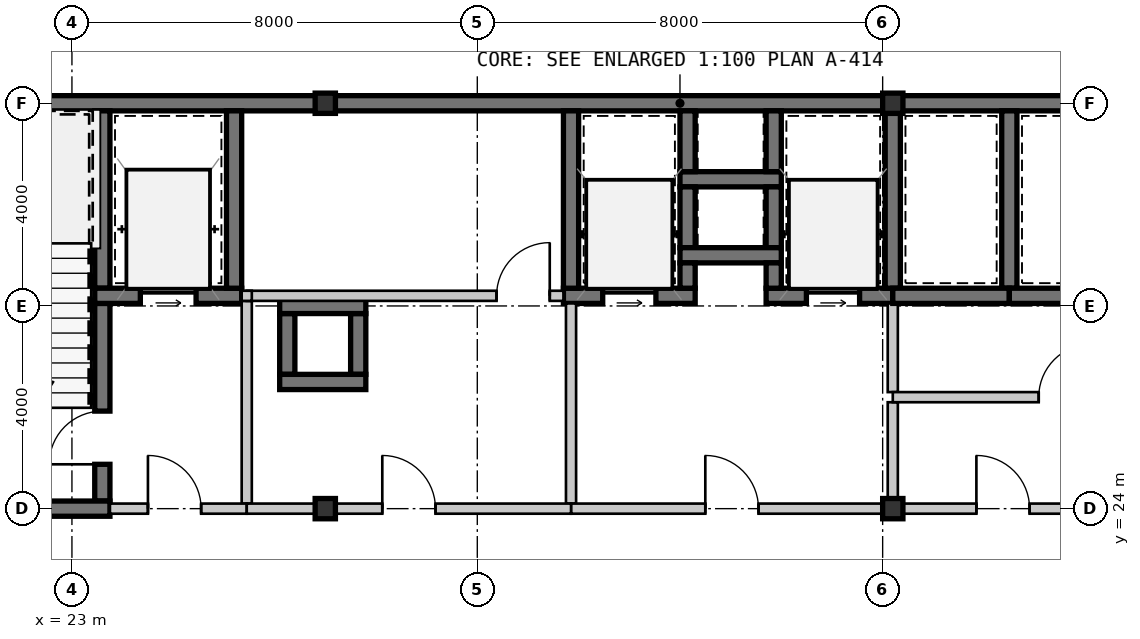
"""IFC4 building model, lengths in metres.
Left out: names, types, materials, properties, quantities, classifications, styles, units other than length and angle.
Written with IfcOpenShell. Run it as: python <this file> out.ifc"""

import sys

from ifc_helpers import new_model, si_unit, direction, frame, frame_2d, origin, origin_2d, place, context, subcontext, project, spatial, rectangle, hollow_rectangle, extrude, source, transform, mapped, element, fill, save


model = new_model("IFC4")
c1 = context("Model", 3, precision=1e-05, world=origin(), true_north=direction((0.0, 1.0)))
c2 = subcontext(c1, "Body", "Model", "MODEL_VIEW")
j1 = project(units=[si_unit("LENGTHUNIT", "METRE"), si_unit("PLANEANGLEUNIT", "RADIAN")], contexts=[c1])
p1 = place(None, origin())
s1 = spatial("IfcSite", under=j1, at=p1, CompositionType="ELEMENT")
p2 = place(p1, origin())
s2 = spatial("IfcBuilding", under=s1, at=p2, CompositionType="ELEMENT")
p3 = place(p2, frame((0.0, 0.0, 126.7)))
s3 = spatial("IfcBuildingStorey", under=s2, at=p3, CompositionType="ELEMENT", Elevation=126.7)
m1 = source(origin(), c2, "Body", "SweptSolid", [
    extrude(hollow_rectangle(XDim=0.4, YDim=0.4, WallThickness=0.016, at=origin_2d()), origin(), (0.0, 0.0, 1.0), 3.15),
])
for number, where, z_axis, x_axis in (
    (1, (28.0, 24.0, 0.0), (0.0, 0.0, 1.0), (1.0, 0.0, 0.0)),
    (2, (39.2, 24.0, 0.0), (0.0, 0.0, 1.0), (1.0, 0.0, 0.0)),
    (3, (28.0, 32.0, 0.0), (0.0, 0.0, 1.0), (1.0, 0.0, 0.0)),
    (4, (39.2, 32.0, 0.0), (0.0, 0.0, 1.0), (1.0, 0.0, 0.0)),
):
    element("IfcColumn", number, at=place(p3, frame(where, z_axis=z_axis, x_axis=x_axis)), inside=s3, PredefinedType="COLUMN", context=c2, shape_type="MappedRepresentation", body=[
        mapped(m1, transform((0.0, 0.0, 0.0), scale=1.0)),
    ])
m2 = source(origin(), c2, "Body", "SweptSolid", [
    extrude(rectangle(XDim=9.15, YDim=0.3, at=frame_2d((4.575, 0.0))), origin(), (0.0, 0.0, 1.0), 2.93),
])
p4 = place(p3, frame((18.85, 32.0, 0.0), z_axis=(0.0, 0.0, 1.0), x_axis=(1.0, 0.0, 0.0)))
e5 = element("IfcWall", 5, at=p4, inside=s3, PredefinedType="SHEAR", context=c2, shape_type="MappedRepresentation", body=[
    mapped(m2, transform((0.0, 0.0, 0.0), scale=1.0)),
])
m3 = source(origin(), c2, "Body", "SweptSolid", [
    extrude(rectangle(XDim=11.2, YDim=0.3, at=frame_2d((5.6, 0.0))), origin(), (0.0, 0.0, 1.0), 2.93),
])
p5 = place(p3, frame((28.0, 32.0, 0.0), z_axis=(0.0, 0.0, 1.0), x_axis=(1.0, 0.0, 0.0)))
e6 = element("IfcWall", 6, at=p5, inside=s3, PredefinedType="SHEAR", context=c2, shape_type="MappedRepresentation", body=[
    mapped(m3, transform((0.0, 0.0, 0.0), scale=1.0)),
])
m4 = source(origin(), c2, "Body", "SweptSolid", [
    extrude(rectangle(XDim=11.95, YDim=0.3, at=frame_2d((5.975, 0.0))), origin(), (0.0, 0.0, 1.0), 2.93),
])
p6 = place(p3, frame((39.2, 32.0, 0.0), z_axis=(0.0, 0.0, 1.0), x_axis=(1.0, 0.0, 0.0)))
e7 = element("IfcWall", 7, at=p6, inside=s3, PredefinedType="SHEAR", context=c2, shape_type="MappedRepresentation", body=[
    mapped(m4, transform((0.0, 0.0, 0.0), scale=1.0)),
])
m5 = source(origin(), c2, "Body", "SweptSolid", [
    extrude(rectangle(XDim=3.5, YDim=0.3, at=frame_2d((1.75, 0.0))), origin(), (0.0, 0.0, 1.0), 2.93),
])
p7 = place(p3, frame((23.6, 28.35, 0.0), z_axis=(0.0, 0.0, 1.0), x_axis=(0.0, 1.0, 0.0)))
e8 = element("IfcWall", 8, at=p7, inside=s3, PredefinedType="SHEAR", context=c2, shape_type="MappedRepresentation", body=[
    mapped(m5, transform((0.0, 0.0, 0.0), scale=1.0)),
])
m6 = source(origin(), c2, "Body", "SweptSolid", [
    extrude(rectangle(XDim=3.9, YDim=0.3, at=frame_2d((1.95, 0.0))), origin(), (0.0, 0.0, 1.0), 2.93),
])
p8 = place(p3, frame((23.6, 24.15, 0.0), z_axis=(0.0, 0.0, 1.0), x_axis=(0.0, 1.0, 0.0)))
e9 = element("IfcWall", 9, at=p8, inside=s3, PredefinedType="SHEAR", context=c2, shape_type="MappedRepresentation", body=[
    mapped(m6, transform((0.0, 0.0, 0.0), scale=1.0)),
])
m7 = source(origin(), c2, "Body", "SweptSolid", [
    extrude(rectangle(XDim=1.05, YDim=2.1, at=frame_2d((0.525, 1.05))), frame((0.0, 0.16, 0.0), z_axis=(0.0, -1.0, 0.0), x_axis=(1.0, 0.0, 0.0)), (0.0, 0.0, 1.0), 0.32),
])
p9 = place(p8, frame((0.725, 0.0, 0.0)))
e10 = element("IfcOpeningElement", 10, at=p9, cuts=e9, PredefinedType="OPENING", context=c2, shape_type="MappedRepresentation", body=[
    mapped(m7, transform((0.0, 0.0, 0.0), scale=1.0)),
])
m8 = source(origin(), c2, "Body", "SweptSolid", [
    extrude(rectangle(XDim=4.9, YDim=0.3, at=frame_2d((2.45, 0.0))), origin(), (0.0, 0.0, 1.0), 2.93),
])
p10 = place(p3, frame((18.85, 24.0, 0.0), z_axis=(0.0, 0.0, 1.0), x_axis=(1.0, 0.0, 0.0)))
e11 = element("IfcWall", 11, at=p10, inside=s3, PredefinedType="SHEAR", context=c2, shape_type="MappedRepresentation", body=[
    mapped(m8, transform((0.0, 0.0, 0.0), scale=1.0)),
])
m9 = source(origin(), c2, "Body", "SweptSolid", [
    extrude(rectangle(XDim=2.9, YDim=0.3, at=frame_2d((1.45, 0.0))), origin(), (0.0, 0.0, 1.0), 2.93),
])
p11 = place(p3, frame((23.45, 28.2, 0.0), z_axis=(0.0, 0.0, 1.0), x_axis=(1.0, 0.0, 0.0)))
e12 = element("IfcWall", 12, at=p11, inside=s3, PredefinedType="SHEAR", context=c2, shape_type="MappedRepresentation", body=[
    mapped(m9, transform((0.0, 0.0, 0.0), scale=1.0)),
])
m10 = source(origin(), c2, "Body", "SweptSolid", [
    extrude(rectangle(XDim=1.1, YDim=2.15, at=frame_2d((0.55, 1.075))), frame((0.0, 0.16, 0.0), z_axis=(0.0, -1.0, 0.0), x_axis=(1.0, 0.0, 0.0)), (0.0, 0.0, 1.0), 0.32),
])
p12 = place(p11, frame((0.9, 0.0, 0.0)))
e13 = element("IfcOpeningElement", 13, at=p12, cuts=e12, PredefinedType="OPENING", context=c2, shape_type="MappedRepresentation", body=[
    mapped(m10, transform((0.0, 0.0, 0.0), scale=1.0)),
])
p13 = place(p3, frame((26.2, 28.35, 0.0), z_axis=(0.0, 0.0, 1.0), x_axis=(0.0, 1.0, 0.0)))
e14 = element("IfcWall", 14, at=p13, inside=s3, PredefinedType="SHEAR", context=c2, shape_type="MappedRepresentation", body=[
    mapped(m5, transform((0.0, 0.0, 0.0), scale=1.0)),
])
m11 = source(origin(), c2, "Body", "SweptSolid", [
    extrude(rectangle(XDim=4.0, YDim=0.2, at=frame_2d((2.0, 0.0))), origin(), (0.0, 0.0, 1.0), 2.93),
])
p14 = place(p3, frame((26.45, 24.1, 0.0), z_axis=(0.0, 0.0, 1.0), x_axis=(0.0, 1.0, 0.0)))
e15 = element("IfcWall", 15, at=p14, inside=s3, PredefinedType="SOLIDWALL", context=c2, shape_type="MappedRepresentation", body=[
    mapped(m11, transform((0.0, 0.0, 0.0), scale=1.0)),
])
m12 = source(origin(), c2, "Body", "SweptSolid", [
    extrude(rectangle(XDim=2.7, YDim=0.2, at=frame_2d((1.35, 0.0))), origin(), (0.0, 0.0, 1.0), 2.47),
])
p15 = place(p3, frame((23.75, 24.0, 0.0), z_axis=(0.0, 0.0, 1.0), x_axis=(1.0, 0.0, 0.0)))
e16 = element("IfcWall", 16, at=p15, inside=s3, PredefinedType="SOLIDWALL", context=c2, shape_type="MappedRepresentation", body=[
    mapped(m12, transform((0.0, 0.0, 0.0), scale=1.0)),
])
m13 = source(origin(), c2, "Body", "SweptSolid", [
    extrude(rectangle(XDim=1.05, YDim=2.1, at=frame_2d((0.525, 1.05))), frame((0.0, 0.11, 0.0), z_axis=(0.0, -1.0, 0.0), x_axis=(1.0, 0.0, 0.0)), (0.0, 0.0, 1.0), 0.22),
])
p16 = place(p15, frame((0.75, 0.0, 0.0)))
e17 = element("IfcOpeningElement", 17, at=p16, cuts=e16, PredefinedType="OPENING", context=c2, shape_type="MappedRepresentation", body=[
    mapped(m13, transform((0.0, 0.0, 0.0), scale=1.0)),
])
m14 = source(origin(), c2, "Body", "SweptSolid", [
    extrude(rectangle(XDim=2.0, YDim=0.3, at=frame_2d((1.0, 0.0))), origin(), (0.0, 0.0, 1.0), 2.93),
])
p17 = place(p3, frame((35.0, 30.5, 0.0), z_axis=(0.0, 0.0, 1.0), x_axis=(1.0, 0.0, 0.0)))
e18 = element("IfcWall", 18, at=p17, inside=s3, PredefinedType="SHEAR", context=c2, shape_type="MappedRepresentation", body=[
    mapped(m14, transform((0.0, 0.0, 0.0), scale=1.0)),
])
m15 = source(origin(), c2, "Body", "SweptSolid", [
    extrude(rectangle(XDim=1.2, YDim=0.3, at=frame_2d((0.6, 0.0))), origin(), (0.0, 0.0, 1.0), 2.93),
])
for number, where, z_axis, x_axis in (
    (19, (35.15, 31.85, 0.0), (0.0, 0.0, 1.0), (0.0, -1.0, 0.0)),
    (20, (36.85, 30.65, 0.0), (0.0, 0.0, 1.0), (0.0, 1.0, 0.0)),
    (21, (35.15, 30.35, 0.0), (0.0, 0.0, 1.0), (0.0, -1.0, 0.0)),
    (22, (36.85, 29.15, 0.0), (0.0, 0.0, 1.0), (0.0, 1.0, 0.0)),
):
    element("IfcWall", number, at=place(p3, frame(where, z_axis=z_axis, x_axis=x_axis)), inside=s3, PredefinedType="SHEAR", context=c2, shape_type="MappedRepresentation", body=[
        mapped(m15, transform((0.0, 0.0, 0.0), scale=1.0)),
    ])
p18 = place(p3, frame((35.0, 29.0, 0.0), z_axis=(0.0, 0.0, 1.0), x_axis=(1.0, 0.0, 0.0)))
e23 = element("IfcWall", 23, at=p18, inside=s3, PredefinedType="SHEAR", context=c2, shape_type="MappedRepresentation", body=[
    mapped(m14, transform((0.0, 0.0, 0.0), scale=1.0)),
])
for number, where, z_axis, x_axis in (
    (24, (28.65, 26.65, 0.0), (0.0, 0.0, 1.0), (0.0, 1.0, 0.0)),
    (25, (27.25, 27.85, 0.0), (0.0, 0.0, 1.0), (0.0, -1.0, 0.0)),
):
    element("IfcWall", number, at=place(p3, frame(where, z_axis=z_axis, x_axis=x_axis)), inside=s3, PredefinedType="SHEAR", context=c2, shape_type="MappedRepresentation", body=[
        mapped(m15, transform((0.0, 0.0, 0.0), scale=1.0)),
    ])
m16 = source(origin(), c2, "Body", "SweptSolid", [
    extrude(rectangle(XDim=1.7, YDim=0.3, at=frame_2d((0.85, 0.0))), origin(), (0.0, 0.0, 1.0), 2.93),
])
for number, where, z_axis, x_axis in (
    (26, (28.8, 28.0, 0.0), (0.0, 0.0, 1.0), (-1.0, 0.0, 0.0)),
    (27, (27.1, 26.5, 0.0), (0.0, 0.0, 1.0), (1.0, 0.0, 0.0)),
):
    element("IfcWall", number, at=place(p3, frame(where, z_axis=z_axis, x_axis=x_axis)), inside=s3, PredefinedType="SHEAR", context=c2, shape_type="MappedRepresentation", body=[
        mapped(m16, transform((0.0, 0.0, 0.0), scale=1.0)),
    ])
m17 = source(origin(), c2, "Body", "SweptSolid", [
    extrude(rectangle(XDim=2.6, YDim=0.3, at=frame_2d((1.3, 0.0))), origin(), (0.0, 0.0, 1.0), 2.93),
])
p19 = place(p3, frame((32.7, 28.2, 0.0), z_axis=(0.0, 0.0, 1.0), x_axis=(1.0, 0.0, 0.0)))
e28 = element("IfcWall", 28, at=p19, inside=s3, PredefinedType="SHEAR", context=c2, shape_type="MappedRepresentation", body=[
    mapped(m17, transform((0.0, 0.0, 0.0), scale=1.0)),
])
m18 = source(origin(), c2, "Body", "SweptSolid", [
    extrude(rectangle(XDim=1.05, YDim=2.15, at=frame_2d((0.525, 1.075))), frame((0.0, 0.16, 0.0), z_axis=(0.0, -1.0, 0.0), x_axis=(1.0, 0.0, 0.0)), (0.0, 0.0, 1.0), 0.32),
])
p20 = place(p19, frame((0.775, 0.0, 0.0)))
e29 = element("IfcOpeningElement", 29, at=p20, cuts=e28, PredefinedType="OPENING", context=c2, shape_type="MappedRepresentation", body=[
    mapped(m18, transform((0.0, 0.0, 0.0), scale=1.0)),
])
m19 = source(origin(), c2, "Body", "SweptSolid", [
    extrude(rectangle(XDim=0.5, YDim=0.3, at=frame_2d((0.25, 0.0))), origin(), (0.0, 0.0, 1.0), 2.93),
])
p21 = place(p3, frame((35.15, 28.35, 0.0), z_axis=(0.0, 0.0, 1.0), x_axis=(0.0, 1.0, 0.0)))
e30 = element("IfcWall", 30, at=p21, inside=s3, PredefinedType="SHEAR", context=c2, shape_type="MappedRepresentation", body=[
    mapped(m19, transform((0.0, 0.0, 0.0), scale=1.0)),
])
p22 = place(p3, frame((32.85, 31.85, 0.0), z_axis=(0.0, 0.0, 1.0), x_axis=(0.0, -1.0, 0.0)))
e31 = element("IfcWall", 31, at=p22, inside=s3, PredefinedType="SHEAR", context=c2, shape_type="MappedRepresentation", body=[
    mapped(m5, transform((0.0, 0.0, 0.0), scale=1.0)),
])
m20 = source(origin(), c2, "Body", "SweptSolid", [
    extrude(rectangle(XDim=2.5, YDim=0.3, at=frame_2d((1.25, 0.0))), origin(), (0.0, 0.0, 1.0), 2.93),
])
p23 = place(p3, frame((36.7, 28.2, 0.0), z_axis=(0.0, 0.0, 1.0), x_axis=(1.0, 0.0, 0.0)))
e32 = element("IfcWall", 32, at=p23, inside=s3, PredefinedType="SHEAR", context=c2, shape_type="MappedRepresentation", body=[
    mapped(m20, transform((0.0, 0.0, 0.0), scale=1.0)),
])
p24 = place(p23, frame((0.795, 0.0, 0.0)))
e33 = element("IfcOpeningElement", 33, at=p24, cuts=e32, PredefinedType="OPENING", context=c2, shape_type="MappedRepresentation", body=[
    mapped(m18, transform((0.0, 0.0, 0.0), scale=1.0)),
])
p25 = place(p3, frame((36.85, 28.85, 0.0), z_axis=(0.0, 0.0, 1.0), x_axis=(0.0, -1.0, 0.0)))
e34 = element("IfcWall", 34, at=p25, inside=s3, PredefinedType="SHEAR", context=c2, shape_type="MappedRepresentation", body=[
    mapped(m19, transform((0.0, 0.0, 0.0), scale=1.0)),
])
p26 = place(p3, frame((39.2, 28.35, 0.0), z_axis=(0.0, 0.0, 1.0), x_axis=(0.0, 1.0, 0.0)))
e35 = element("IfcWall", 35, at=p26, inside=s3, PredefinedType="SHEAR", context=c2, shape_type="MappedRepresentation", body=[
    mapped(m5, transform((0.0, 0.0, 0.0), scale=1.0)),
])
m21 = source(origin(), c2, "Body", "SweptSolid", [
    extrude(rectangle(XDim=3.95, YDim=0.2, at=frame_2d((1.975, 0.0))), origin(), (0.0, 0.0, 1.0), 2.93),
])
p27 = place(p3, frame((32.85, 24.1, 0.0), z_axis=(0.0, 0.0, 1.0), x_axis=(0.0, 1.0, 0.0)))
e36 = element("IfcWall", 36, at=p27, inside=s3, PredefinedType="SOLIDWALL", context=c2, shape_type="MappedRepresentation", body=[
    mapped(m21, transform((0.0, 0.0, 0.0), scale=1.0)),
])
m22 = source(origin(), c2, "Body", "SweptSolid", [
    extrude(rectangle(XDim=2.0, YDim=0.2, at=frame_2d((1.0, 0.0))), origin(), (0.0, 0.0, 1.0), 2.47),
])
p28 = place(p3, frame((39.2, 26.1, 0.0), z_axis=(0.0, 0.0, 1.0), x_axis=(0.0, -1.0, 0.0)))
e37 = element("IfcWall", 37, at=p28, inside=s3, PredefinedType="SOLIDWALL", context=c2, shape_type="MappedRepresentation", body=[
    mapped(m22, transform((0.0, 0.0, 0.0), scale=1.0)),
])
m23 = source(origin(), c2, "Body", "SweptSolid", [
    extrude(rectangle(XDim=1.75, YDim=0.2, at=frame_2d((0.875, 0.0))), origin(), (0.0, 0.0, 1.0), 2.47),
])
p29 = place(p3, frame((39.2, 28.05, 0.0), z_axis=(0.0, 0.0, 1.0), x_axis=(0.0, -1.0, 0.0)))
e38 = element("IfcWall", 38, at=p29, inside=s3, PredefinedType="SOLIDWALL", context=c2, shape_type="MappedRepresentation", body=[
    mapped(m23, transform((0.0, 0.0, 0.0), scale=1.0)),
])
m24 = source(origin(), c2, "Body", "SweptSolid", [
    extrude(rectangle(XDim=6.35, YDim=0.2, at=frame_2d((3.175, 0.0))), origin(), (0.0, 0.0, 1.0), 2.47),
])
p30 = place(p3, frame((39.2, 24.0, 0.0), z_axis=(0.0, 0.0, 1.0), x_axis=(-1.0, 0.0, 0.0)))
e39 = element("IfcWall", 39, at=p30, inside=s3, PredefinedType="SOLIDWALL", context=c2, shape_type="MappedRepresentation", body=[
    mapped(m24, transform((0.0, 0.0, 0.0), scale=1.0)),
])
p31 = place(p30, frame((2.65, 0.0, 0.0)))
e40 = element("IfcOpeningElement", 40, at=p31, cuts=e39, PredefinedType="OPENING", context=c2, shape_type="MappedRepresentation", body=[
    mapped(m13, transform((0.0, 0.0, 0.0), scale=1.0)),
])
p32 = place(p3, frame((41.5, 28.35, 0.0), z_axis=(0.0, 0.0, 1.0), x_axis=(0.0, 1.0, 0.0)))
e41 = element("IfcWall", 41, at=p32, inside=s3, PredefinedType="SHEAR", context=c2, shape_type="MappedRepresentation", body=[
    mapped(m5, transform((0.0, 0.0, 0.0), scale=1.0)),
])
m25 = source(origin(), c2, "Body", "SweptSolid", [
    extrude(rectangle(XDim=2.3, YDim=0.3, at=frame_2d((1.15, 0.0))), origin(), (0.0, 0.0, 1.0), 2.93),
])
p33 = place(p3, frame((39.2, 28.2, 0.0), z_axis=(0.0, 0.0, 1.0), x_axis=(1.0, 0.0, 0.0)))
e42 = element("IfcWall", 42, at=p33, inside=s3, PredefinedType="SHEAR", context=c2, shape_type="MappedRepresentation", body=[
    mapped(m25, transform((0.0, 0.0, 0.0), scale=1.0)),
])
m26 = source(origin(), c2, "Body", "SweptSolid", [
    extrude(rectangle(XDim=2.07, YDim=0.3, at=frame_2d((1.035, 0.0))), origin(), (0.0, 0.0, 1.0), 2.93),
])
p34 = place(p3, frame((41.5, 28.2, 0.0), z_axis=(0.0, 0.0, 1.0), x_axis=(1.0, 0.0, 0.0)))
e43 = element("IfcWall", 43, at=p34, inside=s3, PredefinedType="SHEAR", context=c2, shape_type="MappedRepresentation", body=[
    mapped(m26, transform((0.0, 0.0, 0.0), scale=1.0)),
])
m27 = source(origin(), c2, "Body", "SweptSolid", [
    extrude(rectangle(XDim=6.25, YDim=0.2, at=frame_2d((3.125, 0.0))), origin(), (0.0, 0.0, 1.0), 2.93),
])
p35 = place(p3, frame((26.45, 28.2, 0.0), z_axis=(0.0, 0.0, 1.0), x_axis=(1.0, 0.0, 0.0)))
e44 = element("IfcWall", 44, at=p35, inside=s3, PredefinedType="SOLIDWALL", context=c2, shape_type="MappedRepresentation", body=[
    mapped(m27, transform((0.0, 0.0, 0.0), scale=1.0)),
])
p36 = place(p35, frame((4.93, 0.0, 0.0)))
e45 = element("IfcOpeningElement", 45, at=p36, cuts=e44, PredefinedType="OPENING", context=c2, shape_type="MappedRepresentation", body=[
    mapped(m13, transform((0.0, 0.0, 0.0), scale=1.0)),
])
m28 = source(origin(), c2, "Body", "SweptSolid", [
    extrude(rectangle(XDim=6.4, YDim=0.2, at=frame_2d((3.2, 0.0))), origin(), (0.0, 0.0, 1.0), 2.47),
])
p37 = place(p3, frame((32.85, 24.0, 0.0), z_axis=(0.0, 0.0, 1.0), x_axis=(-1.0, 0.0, 0.0)))
e46 = element("IfcWall", 46, at=p37, inside=s3, PredefinedType="SOLIDWALL", context=c2, shape_type="MappedRepresentation", body=[
    mapped(m28, transform((0.0, 0.0, 0.0), scale=1.0)),
])
p38 = place(p37, frame((2.675, 0.0, 0.0)))
e47 = element("IfcOpeningElement", 47, at=p38, cuts=e46, PredefinedType="OPENING", context=c2, shape_type="MappedRepresentation", body=[
    mapped(m13, transform((0.0, 0.0, 0.0), scale=1.0)),
])
m29 = source(origin(), c2, "Body", "SweptSolid", [
    extrude(rectangle(XDim=4.35, YDim=0.2, at=frame_2d((2.175, 0.0))), origin(), (0.0, 0.0, 1.0), 2.93),
])
p39 = place(p3, frame((39.2, 26.2, 0.0), z_axis=(0.0, 0.0, 1.0), x_axis=(1.0, 0.0, 0.0)))
e48 = element("IfcWall", 48, at=p39, inside=s3, PredefinedType="SOLIDWALL", context=c2, shape_type="MappedRepresentation", body=[
    mapped(m29, transform((0.0, 0.0, 0.0), scale=1.0)),
])
p40 = place(p39, frame((2.88, 0.0, 0.0)))
e49 = element("IfcOpeningElement", 49, at=p40, cuts=e48, PredefinedType="OPENING", context=c2, shape_type="MappedRepresentation", body=[
    mapped(m13, transform((0.0, 0.0, 0.0), scale=1.0)),
])
m30 = source(origin(), c2, "Body", "SweptSolid", [
    extrude(rectangle(XDim=4.35, YDim=0.2, at=frame_2d((2.175, 0.0))), origin(), (0.0, 0.0, 1.0), 2.397),
])
p41 = place(p3, frame((43.55, 24.0, 0.0), z_axis=(0.0, 0.0, 1.0), x_axis=(-1.0, 0.0, 0.0)))
e50 = element("IfcWall", 50, at=p41, inside=s3, PredefinedType="SOLIDWALL", context=c2, shape_type="MappedRepresentation", body=[
    mapped(m30, transform((0.0, 0.0, 0.0), scale=1.0)),
])
p42 = place(p41, frame((1.65, 0.0, 0.0)))
e51 = element("IfcOpeningElement", 51, at=p42, cuts=e50, PredefinedType="OPENING", context=c2, shape_type="MappedRepresentation", body=[
    mapped(m13, transform((0.0, 0.0, 0.0), scale=1.0)),
])
m31 = source(origin(), c2, "Body", "SweptSolid", [
    extrude(rectangle(XDim=0.2, YDim=0.2, at=frame_2d((0.1, 0.0))), origin(), (0.0, 0.0, 1.0), 2.93),
])
p43 = place(p3, frame((26.35, 28.2, 0.0), z_axis=(0.0, 0.0, 1.0), x_axis=(1.0, 0.0, 0.0)))
e52 = element("IfcWall", 52, at=p43, inside=s3, PredefinedType="SOLIDWALL", context=c2, shape_type="MappedRepresentation", body=[
    mapped(m31, transform((0.0, 0.0, 0.0), scale=1.0)),
])
m32 = source(origin(), c2, "Body", "SweptSolid", [
    extrude(rectangle(XDim=1.05, YDim=2.1, at=frame_2d((0.525, 1.05))), frame((0.0, 0.025, 0.0), z_axis=(0.0, -1.0, 0.0), x_axis=(1.0, 0.0, 0.0)), (0.0, 0.0, 1.0), 0.05),
])
p44 = place(p9, origin())
e53 = element("IfcDoor", 53, at=p44, inside=s3, OperationType="SINGLE_SWING_LEFT", PredefinedType="DOOR", context=c2, shape_type="MappedRepresentation", body=[
    mapped(m32, transform((0.0, 0.0, 0.0), scale=1.0)),
])
fill(e10, e53)
m33 = source(origin(), c2, "Body", "SweptSolid", [
    extrude(rectangle(XDim=1.1, YDim=2.15, at=frame_2d((0.55, 1.075))), frame((0.0, 0.025, 0.0), z_axis=(0.0, -1.0, 0.0), x_axis=(1.0, 0.0, 0.0)), (0.0, 0.0, 1.0), 0.05),
])
p45 = place(p12, origin())
e54 = element("IfcDoor", 54, at=p45, inside=s3, OperationType="SLIDING_TO_LEFT", PredefinedType="DOOR", context=c2, shape_type="MappedRepresentation", body=[
    mapped(m33, transform((0.0, 0.0, 0.0), scale=1.0)),
])
fill(e13, e54)
p46 = place(p16, origin())
e55 = element("IfcDoor", 55, at=p46, inside=s3, OperationType="SINGLE_SWING_LEFT", PredefinedType="DOOR", context=c2, shape_type="MappedRepresentation", body=[
    mapped(m32, transform((0.0, 0.0, 0.0), scale=1.0)),
])
fill(e17, e55)
m34 = source(origin(), c2, "Body", "SweptSolid", [
    extrude(rectangle(XDim=1.05, YDim=2.15, at=frame_2d((0.525, 1.075))), frame((0.0, 0.025, 0.0), z_axis=(0.0, -1.0, 0.0), x_axis=(1.0, 0.0, 0.0)), (0.0, 0.0, 1.0), 0.05),
])
p47 = place(p20, origin())
e56 = element("IfcDoor", 56, at=p47, inside=s3, OperationType="SLIDING_TO_LEFT", PredefinedType="DOOR", context=c2, shape_type="MappedRepresentation", body=[
    mapped(m34, transform((0.0, 0.0, 0.0), scale=1.0)),
])
fill(e29, e56)
p48 = place(p24, origin())
e57 = element("IfcDoor", 57, at=p48, inside=s3, OperationType="SLIDING_TO_LEFT", PredefinedType="DOOR", context=c2, shape_type="MappedRepresentation", body=[
    mapped(m34, transform((0.0, 0.0, 0.0), scale=1.0)),
])
fill(e33, e57)
p49 = place(p31, frame((1.05, 0.0, 0.0), z_axis=(0.0, 0.0, 1.0), x_axis=(-1.0, 0.0, 0.0)))
e58 = element("IfcDoor", 58, at=p49, inside=s3, OperationType="SINGLE_SWING_LEFT", PredefinedType="DOOR", context=c2, shape_type="MappedRepresentation", body=[
    mapped(m32, transform((0.0, 0.0, 0.0), scale=1.0)),
])
fill(e40, e58)
p50 = place(p36, origin())
e59 = element("IfcDoor", 59, at=p50, inside=s3, OperationType="SINGLE_SWING_RIGHT", PredefinedType="DOOR", context=c2, shape_type="MappedRepresentation", body=[
    mapped(m32, transform((0.0, 0.0, 0.0), scale=1.0)),
])
fill(e45, e59)
p51 = place(p38, frame((1.05, 0.0, 0.0), z_axis=(0.0, 0.0, 1.0), x_axis=(-1.0, 0.0, 0.0)))
e60 = element("IfcDoor", 60, at=p51, inside=s3, OperationType="SINGLE_SWING_LEFT", PredefinedType="DOOR", context=c2, shape_type="MappedRepresentation", body=[
    mapped(m32, transform((0.0, 0.0, 0.0), scale=1.0)),
])
fill(e47, e60)
p52 = place(p40, origin())
e61 = element("IfcDoor", 61, at=p52, inside=s3, OperationType="SINGLE_SWING_RIGHT", PredefinedType="DOOR", context=c2, shape_type="MappedRepresentation", body=[
    mapped(m32, transform((0.0, 0.0, 0.0), scale=1.0)),
])
fill(e49, e61)
p53 = place(p42, frame((1.05, 0.0, 0.0), z_axis=(0.0, 0.0, 1.0), x_axis=(-1.0, 0.0, 0.0)))
e62 = element("IfcDoor", 62, at=p53, inside=s3, OperationType="SINGLE_SWING_LEFT", PredefinedType="DOOR", context=c2, shape_type="MappedRepresentation", body=[
    mapped(m32, transform((0.0, 0.0, 0.0), scale=1.0)),
])
fill(e51, e62)
save(model, sys.argv[1])
